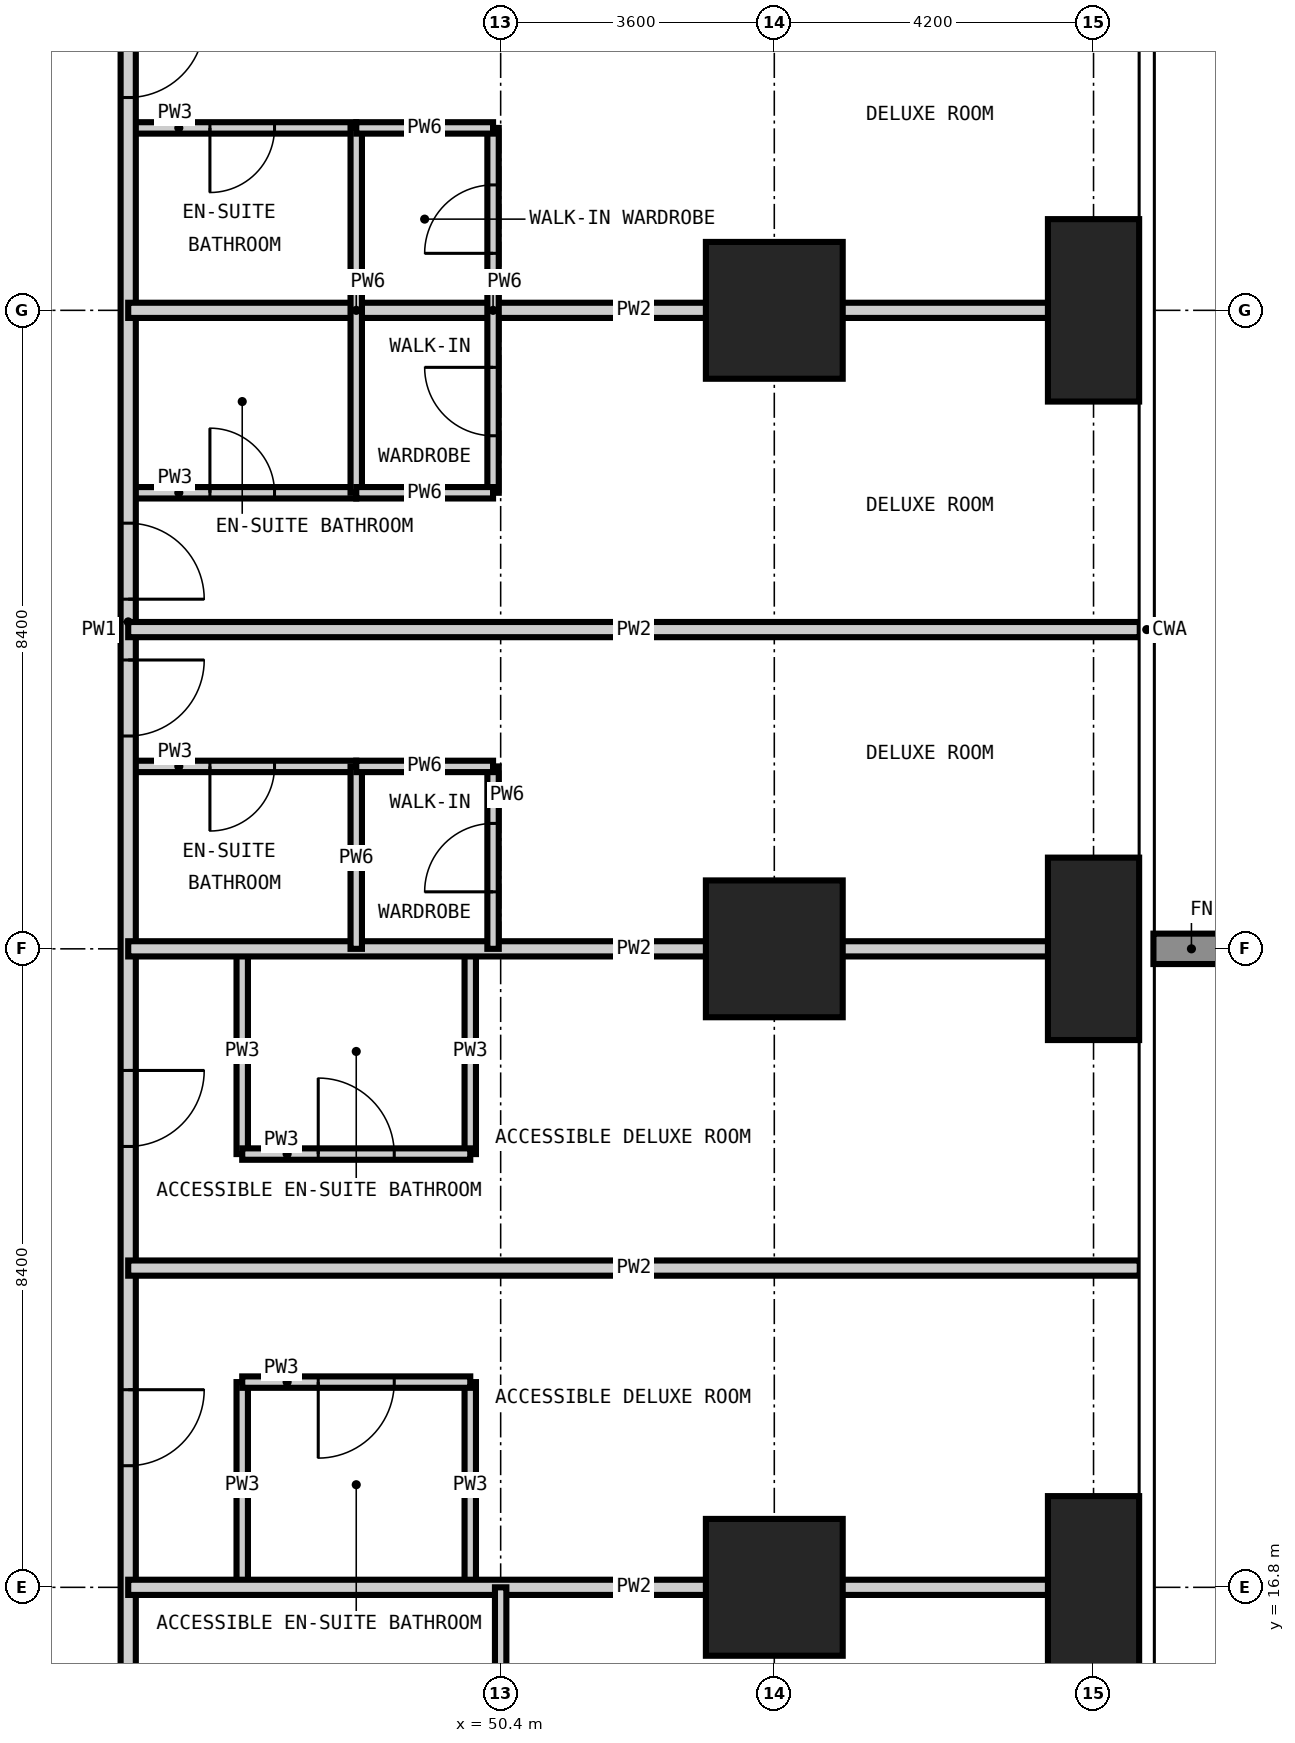
"""IFC4 building model, lengths in metres.
Left out: names, types, materials, properties, quantities, classifications, styles, units other than length and angle.
Written with IfcOpenShell. Run it as: python <this file> out.ifc"""

import sys

from ifc_helpers import new_model, si_unit, direction, frame, frame_2d, origin, origin_2d, place, context, subcontext, project, spatial, rectangle, extrude, element, fill, save


model = new_model("IFC4")
c1 = context("Model", 3, precision=1e-05, world=origin(), true_north=direction((0.0, 1.0)))
c2 = subcontext(c1, "Body", "Model", "MODEL_VIEW")
j1 = project(units=[si_unit("LENGTHUNIT", "METRE"), si_unit("PLANEANGLEUNIT", "RADIAN")], contexts=[c1])
p1 = place(None, origin())
s1 = spatial("IfcSite", under=j1, at=p1, CompositionType="ELEMENT")
p2 = place(p1, origin())
s2 = spatial("IfcBuilding", under=s1, at=p2, CompositionType="ELEMENT")
p3 = place(p2, frame((0.0, 0.0, 30.6)))
s3 = spatial("IfcBuildingStorey", under=s2, at=p3, CompositionType="ELEMENT", Elevation=30.6)
for number, where, z_axis, x_axis in (
    (1, (54.0, 16.8, -0.35), (0.0, 0.0, 1.0), (1.0, 0.0, 0.0)),
    (2, (54.0, 25.2, -0.35), (0.0, 0.0, 1.0), (1.0, 0.0, 0.0)),
    (3, (54.0, 33.6, -0.35), (0.0, 0.0, 1.0), (1.0, 0.0, 0.0)),
):
    element("IfcColumn", number, at=place(p3, frame(where, z_axis=z_axis, x_axis=x_axis)), inside=s3, PredefinedType="COLUMN", context=c2, shape_type="SweptSolid", body=[
        extrude(rectangle(XDim=1.8, YDim=1.8, at=origin_2d()), origin(), (0.0, 0.0, 1.0), 3.6),
    ])
for number, where, z_axis, x_axis in (
    (4, (58.2, 16.8, -0.35), (0.0, 0.0, 1.0), (1.0, 0.0, 0.0)),
    (5, (58.2, 25.2, -0.35), (0.0, 0.0, 1.0), (1.0, 0.0, 0.0)),
    (6, (58.2, 33.6, -0.35), (0.0, 0.0, 1.0), (1.0, 0.0, 0.0)),
):
    element("IfcColumn", number, at=place(p3, frame(where, z_axis=z_axis, x_axis=x_axis)), inside=s3, PredefinedType="COLUMN", context=c2, shape_type="SweptSolid", body=[
        extrude(rectangle(XDim=1.2, YDim=2.4, at=origin_2d()), origin(), (0.0, 0.0, 1.0), 3.6),
    ])
for number, where, z_axis, x_axis in (
    (7, (47.0, 16.8, 0.0), (0.0, 0.0, 1.0), (0.0, 1.0, 0.0)),
    (8, (47.0, 22.5, 0.0), (0.0, 0.0, 1.0), (0.0, 1.0, 0.0)),
    (9, (50.0, 16.8, 0.0), (0.0, 0.0, 1.0), (0.0, 1.0, 0.0)),
    (10, (50.0, 22.5, 0.0), (0.0, 0.0, 1.0), (0.0, 1.0, 0.0)),
):
    element("IfcWall", number, at=place(p3, frame(where, z_axis=z_axis, x_axis=x_axis)), inside=s3, PredefinedType="PARTITIONING", context=c2, shape_type="SweptSolid", body=[
        extrude(rectangle(XDim=2.7, YDim=0.15, at=frame_2d((1.35, 0.0))), origin(), (0.0, 0.0, 1.0), 3.25),
    ])
p4 = place(p3, frame((47.0, 19.5, 0.0), z_axis=(0.0, 0.0, 1.0), x_axis=(1.0, 0.0, 0.0)))
e11 = element("IfcWall", 11, at=p4, inside=s3, PredefinedType="PARTITIONING", context=c2, shape_type="SweptSolid", body=[
    extrude(rectangle(XDim=3.0, YDim=0.15, at=frame_2d((1.5, 0.0))), origin(), (0.0, 0.0, 1.0), 3.25),
])
p5 = place(p4, frame((1.0, 0.0, 0.0)))
e12 = element("IfcOpeningElement", 12, at=p5, cuts=e11, PredefinedType="OPENING", context=c2, shape_type="SweptSolid", body=[
    extrude(rectangle(XDim=1.0, YDim=2.1, at=frame_2d((0.5, 1.05))), frame((0.0, 0.085, 0.0), z_axis=(0.0, -1.0, 0.0), x_axis=(1.0, 0.0, 0.0)), (0.0, 0.0, 1.0), 0.17),
])
p6 = place(p3, frame((47.0, 22.5, 0.0), z_axis=(0.0, 0.0, 1.0), x_axis=(1.0, 0.0, 0.0)))
e13 = element("IfcWall", 13, at=p6, inside=s3, PredefinedType="PARTITIONING", context=c2, shape_type="SweptSolid", body=[
    extrude(rectangle(XDim=3.0, YDim=0.15, at=frame_2d((1.5, 0.0))), origin(), (0.0, 0.0, 1.0), 3.25),
])
p7 = place(p6, frame((1.0, 0.0, 0.0)))
e14 = element("IfcOpeningElement", 14, at=p7, cuts=e13, PredefinedType="OPENING", context=c2, shape_type="SweptSolid", body=[
    extrude(rectangle(XDim=1.0, YDim=2.1, at=frame_2d((0.5, 1.05))), frame((0.0, 0.085, 0.0), z_axis=(0.0, -1.0, 0.0), x_axis=(1.0, 0.0, 0.0)), (0.0, 0.0, 1.0), 0.17),
])
p8 = place(p3, frame((45.5, 27.6, 0.0), z_axis=(0.0, 0.0, 1.0), x_axis=(1.0, 0.0, 0.0)))
e15 = element("IfcWall", 15, at=p8, inside=s3, PredefinedType="PARTITIONING", context=c2, shape_type="SweptSolid", body=[
    extrude(rectangle(XDim=3.0, YDim=0.15, at=frame_2d((1.5, 0.0))), origin(), (0.0, 0.0, 1.0), 3.25),
])
p9 = place(p8, frame((1.075, 0.0, 0.0)))
e16 = element("IfcOpeningElement", 16, at=p9, cuts=e15, PredefinedType="OPENING", context=c2, shape_type="SweptSolid", body=[
    extrude(rectangle(XDim=0.85, YDim=2.1, at=frame_2d((0.425, 1.05))), frame((0.0, 0.085, 0.0), z_axis=(0.0, -1.0, 0.0), x_axis=(1.0, 0.0, 0.0)), (0.0, 0.0, 1.0), 0.17),
])
p10 = place(p3, frame((45.5, 31.2, 0.0), z_axis=(0.0, 0.0, 1.0), x_axis=(1.0, 0.0, 0.0)))
e17 = element("IfcWall", 17, at=p10, inside=s3, PredefinedType="PARTITIONING", context=c2, shape_type="SweptSolid", body=[
    extrude(rectangle(XDim=3.0, YDim=0.15, at=frame_2d((1.5, 0.0))), origin(), (0.0, 0.0, 1.0), 3.25),
])
p11 = place(p10, frame((1.075, 0.0, 0.0)))
e18 = element("IfcOpeningElement", 18, at=p11, cuts=e17, PredefinedType="OPENING", context=c2, shape_type="SweptSolid", body=[
    extrude(rectangle(XDim=0.85, YDim=2.1, at=frame_2d((0.425, 1.05))), frame((0.0, 0.085, 0.0), z_axis=(0.0, -1.0, 0.0), x_axis=(1.0, 0.0, 0.0)), (0.0, 0.0, 1.0), 0.17),
])
p12 = place(p3, frame((45.5, 36.0, 0.0), z_axis=(0.0, 0.0, 1.0), x_axis=(1.0, 0.0, 0.0)))
e19 = element("IfcWall", 19, at=p12, inside=s3, PredefinedType="PARTITIONING", context=c2, shape_type="SweptSolid", body=[
    extrude(rectangle(XDim=3.0, YDim=0.15, at=frame_2d((1.5, 0.0))), origin(), (0.0, 0.0, 1.0), 3.25),
])
p13 = place(p12, frame((1.075, 0.0, 0.0)))
e20 = element("IfcOpeningElement", 20, at=p13, cuts=e19, PredefinedType="OPENING", context=c2, shape_type="SweptSolid", body=[
    extrude(rectangle(XDim=0.85, YDim=2.1, at=frame_2d((0.425, 1.05))), frame((0.0, 0.085, 0.0), z_axis=(0.0, -1.0, 0.0), x_axis=(1.0, 0.0, 0.0)), (0.0, 0.0, 1.0), 0.17),
])
p14 = place(p3, frame((45.5, 45.8, 0.0), z_axis=(0.0, 0.0, 1.0), x_axis=(0.0, -1.0, 0.0)))
e21 = element("IfcWall", 21, at=p14, inside=s3, PredefinedType="PARTITIONING", context=c2, shape_type="SweptSolid", body=[
    extrude(rectangle(XDim=32.2, YDim=0.2, at=frame_2d((16.1, 0.0))), origin(), (0.0, 0.0, 1.0), 3.25),
])
p15 = place(p14, frame((26.4, 0.0, 0.0)))
e22 = element("IfcOpeningElement", 22, at=p15, cuts=e21, PredefinedType="OPENING", context=c2, shape_type="SweptSolid", body=[
    extrude(rectangle(XDim=1.0, YDim=2.2, at=frame_2d((0.5, 1.1))), frame((0.0, 0.11, 0.0), z_axis=(0.0, -1.0, 0.0), x_axis=(1.0, 0.0, 0.0)), (0.0, 0.0, 1.0), 0.22),
])
p16 = place(p14, frame((22.2, 0.0, 0.0)))
e23 = element("IfcOpeningElement", 23, at=p16, cuts=e21, PredefinedType="OPENING", context=c2, shape_type="SweptSolid", body=[
    extrude(rectangle(XDim=1.0, YDim=2.2, at=frame_2d((0.5, 1.1))), frame((0.0, 0.11, 0.0), z_axis=(0.0, -1.0, 0.0), x_axis=(1.0, 0.0, 0.0)), (0.0, 0.0, 1.0), 0.22),
])
p17 = place(p14, frame((16.8, 0.0, 0.0)))
e24 = element("IfcOpeningElement", 24, at=p17, cuts=e21, PredefinedType="OPENING", context=c2, shape_type="SweptSolid", body=[
    extrude(rectangle(XDim=1.0, YDim=2.2, at=frame_2d((0.5, 1.1))), frame((0.0, 0.11, 0.0), z_axis=(0.0, -1.0, 0.0), x_axis=(1.0, 0.0, 0.0)), (0.0, 0.0, 1.0), 0.22),
])
p18 = place(p14, frame((15.0, 0.0, 0.0)))
e25 = element("IfcOpeningElement", 25, at=p18, cuts=e21, PredefinedType="OPENING", context=c2, shape_type="SweptSolid", body=[
    extrude(rectangle(XDim=1.0, YDim=2.2, at=frame_2d((0.5, 1.1))), frame((0.0, 0.11, 0.0), z_axis=(0.0, -1.0, 0.0), x_axis=(1.0, 0.0, 0.0)), (0.0, 0.0, 1.0), 0.22),
])
p19 = place(p14, frame((8.4, 0.0, 0.0)))
e26 = element("IfcOpeningElement", 26, at=p19, cuts=e21, PredefinedType="OPENING", context=c2, shape_type="SweptSolid", body=[
    extrude(rectangle(XDim=1.0, YDim=2.2, at=frame_2d((0.5, 1.1))), frame((0.0, 0.11, 0.0), z_axis=(0.0, -1.0, 0.0), x_axis=(1.0, 0.0, 0.0)), (0.0, 0.0, 1.0), 0.22),
])
p20 = place(p14, frame((6.6, 0.0, 0.0)))
e27 = element("IfcOpeningElement", 27, at=p20, cuts=e21, PredefinedType="OPENING", context=c2, shape_type="SweptSolid", body=[
    extrude(rectangle(XDim=1.0, YDim=2.2, at=frame_2d((0.5, 1.1))), frame((0.0, 0.11, 0.0), z_axis=(0.0, -1.0, 0.0), x_axis=(1.0, 0.0, 0.0)), (0.0, 0.0, 1.0), 0.22),
])
p21 = place(p14, frame((30.1, 0.0, 0.0)))
e28 = element("IfcOpeningElement", 28, at=p21, cuts=e21, PredefinedType="OPENING", context=c2, shape_type="SweptSolid", body=[
    extrude(rectangle(XDim=1.0, YDim=2.2, at=frame_2d((0.5, 1.1))), frame((0.0, 0.11, 0.0), z_axis=(0.0, -1.0, 0.0), x_axis=(1.0, 0.0, 0.0)), (0.0, 0.0, 1.0), 0.22),
])
p22 = place(p14, frame((1.4, 0.0, 0.0)))
e29 = element("IfcOpeningElement", 29, at=p22, cuts=e21, PredefinedType="OPENING", context=c2, shape_type="SweptSolid", body=[
    extrude(rectangle(XDim=1.0, YDim=2.2, at=frame_2d((0.5, 1.1))), frame((0.0, 0.11, 0.0), z_axis=(0.0, -1.0, 0.0), x_axis=(1.0, 0.0, 0.0)), (0.0, 0.0, 1.0), 0.22),
])
for number, where, z_axis, x_axis in (
    (30, (45.5, 16.8, 0.0), (0.0, 0.0, 1.0), (1.0, 0.0, 0.0)),
    (31, (45.5, 21.0, 0.0), (0.0, 0.0, 1.0), (1.0, 0.0, 0.0)),
    (32, (45.5, 25.2, 0.0), (0.0, 0.0, 1.0), (1.0, 0.0, 0.0)),
    (33, (45.5, 29.4, 0.0), (0.0, 0.0, 1.0), (1.0, 0.0, 0.0)),
    (34, (45.5, 33.6, 0.0), (0.0, 0.0, 1.0), (1.0, 0.0, 0.0)),
):
    element("IfcWall", number, at=place(p3, frame(where, z_axis=z_axis, x_axis=x_axis)), inside=s3, PredefinedType="PARTITIONING", context=c2, shape_type="SweptSolid", body=[
        extrude(rectangle(XDim=13.308, YDim=0.2, at=frame_2d((6.654, 0.0))), origin(), (0.0, 0.0, 1.0), 3.25),
    ])
p23 = place(p3, frame((48.5, 25.2, 0.0), z_axis=(0.0, 0.0, 1.0), x_axis=(0.0, 1.0, 0.0)))
e35 = element("IfcWall", 35, at=p23, inside=s3, PredefinedType="PARTITIONING", context=c2, shape_type="SweptSolid", body=[
    extrude(rectangle(XDim=2.4, YDim=0.15, at=frame_2d((1.2, 0.0))), origin(), (0.0, 0.0, 1.0), 3.25),
])
p24 = place(p3, frame((48.5, 31.2, 0.0), z_axis=(0.0, 0.0, 1.0), x_axis=(0.0, 1.0, 0.0)))
e36 = element("IfcWall", 36, at=p24, inside=s3, PredefinedType="PARTITIONING", context=c2, shape_type="SweptSolid", body=[
    extrude(rectangle(XDim=4.8, YDim=0.15, at=frame_2d((2.4, 0.0))), origin(), (0.0, 0.0, 1.0), 3.25),
])
p25 = place(p3, frame((50.3, 25.2, 0.0), z_axis=(0.0, 0.0, 1.0), x_axis=(0.0, 1.0, 0.0)))
e37 = element("IfcWall", 37, at=p25, inside=s3, PredefinedType="PARTITIONING", context=c2, shape_type="SweptSolid", body=[
    extrude(rectangle(XDim=2.4, YDim=0.15, at=frame_2d((1.2, 0.0))), origin(), (0.0, 0.0, 1.0), 3.25),
])
p26 = place(p25, frame((0.75, 0.0, 0.0)))
e38 = element("IfcOpeningElement", 38, at=p26, cuts=e37, PredefinedType="OPENING", context=c2, shape_type="SweptSolid", body=[
    extrude(rectangle(XDim=0.9, YDim=2.1, at=frame_2d((0.45, 1.05))), frame((0.0, 0.085, 0.0), z_axis=(0.0, -1.0, 0.0), x_axis=(1.0, 0.0, 0.0)), (0.0, 0.0, 1.0), 0.17),
])
p27 = place(p3, frame((50.3, 31.2, 0.0), z_axis=(0.0, 0.0, 1.0), x_axis=(0.0, 1.0, 0.0)))
e39 = element("IfcWall", 39, at=p27, inside=s3, PredefinedType="PARTITIONING", context=c2, shape_type="SweptSolid", body=[
    extrude(rectangle(XDim=4.8, YDim=0.15, at=frame_2d((2.4, 0.0))), origin(), (0.0, 0.0, 1.0), 3.25),
])
p28 = place(p27, frame((0.75, 0.0, 0.0)))
e40 = element("IfcOpeningElement", 40, at=p28, cuts=e39, PredefinedType="OPENING", context=c2, shape_type="SweptSolid", body=[
    extrude(rectangle(XDim=0.9, YDim=2.1, at=frame_2d((0.45, 1.05))), frame((0.0, 0.085, 0.0), z_axis=(0.0, -1.0, 0.0), x_axis=(1.0, 0.0, 0.0)), (0.0, 0.0, 1.0), 0.17),
])
p29 = place(p27, frame((3.15, 0.0, 0.0)))
e41 = element("IfcOpeningElement", 41, at=p29, cuts=e39, PredefinedType="OPENING", context=c2, shape_type="SweptSolid", body=[
    extrude(rectangle(XDim=0.9, YDim=2.1, at=frame_2d((0.45, 1.05))), frame((0.0, 0.085, 0.0), z_axis=(0.0, -1.0, 0.0), x_axis=(1.0, 0.0, 0.0)), (0.0, 0.0, 1.0), 0.17),
])
p30 = place(p3, frame((50.4, -0.008, 0.0), z_axis=(0.0, 0.0, 1.0), x_axis=(0.0, 1.0, 0.0)))
e42 = element("IfcWall", 42, at=p30, inside=s3, PredefinedType="PARTITIONING", context=c2, shape_type="SweptSolid", body=[
    extrude(rectangle(XDim=16.808, YDim=0.15, at=frame_2d((8.404, 0.0))), origin(), (0.0, 0.0, 1.0), 3.25),
])
p31 = place(p30, frame((1.958, 0.0, 0.0)))
e43 = element("IfcOpeningElement", 43, at=p31, cuts=e42, PredefinedType="OPENING", context=c2, shape_type="SweptSolid", body=[
    extrude(rectangle(XDim=0.9, YDim=2.1, at=frame_2d((0.45, 1.05))), frame((0.0, 0.085, 0.0), z_axis=(0.0, -1.0, 0.0), x_axis=(1.0, 0.0, 0.0)), (0.0, 0.0, 1.0), 0.17),
])
p32 = place(p30, frame((12.158, 0.0, 0.0)))
e44 = element("IfcOpeningElement", 44, at=p32, cuts=e42, PredefinedType="OPENING", context=c2, shape_type="SweptSolid", body=[
    extrude(rectangle(XDim=0.9, YDim=2.1, at=frame_2d((0.45, 1.05))), frame((0.0, 0.085, 0.0), z_axis=(0.0, -1.0, 0.0), x_axis=(1.0, 0.0, 0.0)), (0.0, 0.0, 1.0), 0.17),
])
for number, where, z_axis, x_axis in (
    (45, (48.5, 27.6, 0.0), (0.0, 0.0, 1.0), (1.0, 0.0, 0.0)),
    (46, (48.5, 31.2, 0.0), (0.0, 0.0, 1.0), (1.0, 0.0, 0.0)),
    (47, (48.5, 36.0, 0.0), (0.0, 0.0, 1.0), (1.0, 0.0, 0.0)),
):
    element("IfcWall", number, at=place(p3, frame(where, z_axis=z_axis, x_axis=x_axis)), inside=s3, PredefinedType="PARTITIONING", context=c2, shape_type="SweptSolid", body=[
        extrude(rectangle(XDim=1.8, YDim=0.15, at=frame_2d((0.9, 0.0))), origin(), (0.0, 0.0, 1.0), 3.25),
    ])
p33 = place(p15, origin())
e48 = element("IfcDoor", 48, at=p33, inside=s3, OperationType="SINGLE_SWING_LEFT", PredefinedType="DOOR", context=c2, shape_type="SweptSolid", body=[
    extrude(rectangle(XDim=1.0, YDim=2.2, at=frame_2d((0.5, 1.1))), frame((0.0, 0.025, 0.0), z_axis=(0.0, -1.0, 0.0), x_axis=(1.0, 0.0, 0.0)), (0.0, 0.0, 1.0), 0.05),
])
fill(e22, e48)
p34 = place(p5, frame((1.0, 0.0, 0.0), z_axis=(0.0, 0.0, 1.0), x_axis=(-1.0, 0.0, 0.0)))
e49 = element("IfcDoor", 49, at=p34, inside=s3, OperationType="SINGLE_SWING_RIGHT", PredefinedType="DOOR", context=c2, shape_type="SweptSolid", body=[
    extrude(rectangle(XDim=1.0, YDim=2.1, at=frame_2d((0.5, 1.05))), frame((0.0, 0.025, 0.0), z_axis=(0.0, -1.0, 0.0), x_axis=(1.0, 0.0, 0.0)), (0.0, 0.0, 1.0), 0.05),
])
fill(e12, e49)
p35 = place(p16, origin())
e50 = element("IfcDoor", 50, at=p35, inside=s3, OperationType="SINGLE_SWING_LEFT", PredefinedType="DOOR", context=c2, shape_type="SweptSolid", body=[
    extrude(rectangle(XDim=1.0, YDim=2.2, at=frame_2d((0.5, 1.1))), frame((0.0, 0.025, 0.0), z_axis=(0.0, -1.0, 0.0), x_axis=(1.0, 0.0, 0.0)), (0.0, 0.0, 1.0), 0.05),
])
fill(e23, e50)
p36 = place(p7, origin())
e51 = element("IfcDoor", 51, at=p36, inside=s3, OperationType="SINGLE_SWING_LEFT", PredefinedType="DOOR", context=c2, shape_type="SweptSolid", body=[
    extrude(rectangle(XDim=1.0, YDim=2.1, at=frame_2d((0.5, 1.05))), frame((0.0, 0.025, 0.0), z_axis=(0.0, -1.0, 0.0), x_axis=(1.0, 0.0, 0.0)), (0.0, 0.0, 1.0), 0.05),
])
fill(e14, e51)
p37 = place(p17, origin())
e52 = element("IfcDoor", 52, at=p37, inside=s3, OperationType="SINGLE_SWING_LEFT", PredefinedType="DOOR", context=c2, shape_type="SweptSolid", body=[
    extrude(rectangle(XDim=1.0, YDim=2.2, at=frame_2d((0.5, 1.1))), frame((0.0, 0.025, 0.0), z_axis=(0.0, -1.0, 0.0), x_axis=(1.0, 0.0, 0.0)), (0.0, 0.0, 1.0), 0.05),
])
fill(e24, e52)
p38 = place(p9, frame((0.85, 0.0, 0.0), z_axis=(0.0, 0.0, 1.0), x_axis=(-1.0, 0.0, 0.0)))
e53 = element("IfcDoor", 53, at=p38, inside=s3, OperationType="SINGLE_SWING_RIGHT", PredefinedType="DOOR", context=c2, shape_type="SweptSolid", body=[
    extrude(rectangle(XDim=0.85, YDim=2.1, at=frame_2d((0.425, 1.05))), frame((0.0, 0.025, 0.0), z_axis=(0.0, -1.0, 0.0), x_axis=(1.0, 0.0, 0.0)), (0.0, 0.0, 1.0), 0.05),
])
fill(e16, e53)
p39 = place(p26, origin())
e54 = element("IfcDoor", 54, at=p39, inside=s3, OperationType="SINGLE_SWING_LEFT", PredefinedType="DOOR", context=c2, shape_type="SweptSolid", body=[
    extrude(rectangle(XDim=0.9, YDim=2.1, at=frame_2d((0.45, 1.05))), frame((0.0, 0.025, 0.0), z_axis=(0.0, -1.0, 0.0), x_axis=(1.0, 0.0, 0.0)), (0.0, 0.0, 1.0), 0.05),
])
fill(e38, e54)
p40 = place(p18, origin())
e55 = element("IfcDoor", 55, at=p40, inside=s3, OperationType="SINGLE_SWING_RIGHT", PredefinedType="DOOR", context=c2, shape_type="SweptSolid", body=[
    extrude(rectangle(XDim=1.0, YDim=2.2, at=frame_2d((0.5, 1.1))), frame((0.0, 0.025, 0.0), z_axis=(0.0, -1.0, 0.0), x_axis=(1.0, 0.0, 0.0)), (0.0, 0.0, 1.0), 0.05),
])
fill(e25, e55)
p41 = place(p11, origin())
e56 = element("IfcDoor", 56, at=p41, inside=s3, OperationType="SINGLE_SWING_LEFT", PredefinedType="DOOR", context=c2, shape_type="SweptSolid", body=[
    extrude(rectangle(XDim=0.85, YDim=2.1, at=frame_2d((0.425, 1.05))), frame((0.0, 0.025, 0.0), z_axis=(0.0, -1.0, 0.0), x_axis=(1.0, 0.0, 0.0)), (0.0, 0.0, 1.0), 0.05),
])
fill(e18, e56)
p42 = place(p28, origin())
e57 = element("IfcDoor", 57, at=p42, inside=s3, OperationType="SINGLE_SWING_RIGHT", PredefinedType="DOOR", context=c2, shape_type="SweptSolid", body=[
    extrude(rectangle(XDim=0.9, YDim=2.1, at=frame_2d((0.45, 1.05))), frame((0.0, 0.025, 0.0), z_axis=(0.0, -1.0, 0.0), x_axis=(1.0, 0.0, 0.0)), (0.0, 0.0, 1.0), 0.05),
])
fill(e40, e57)
p43 = place(p19, origin())
e58 = element("IfcDoor", 58, at=p43, inside=s3, OperationType="SINGLE_SWING_LEFT", PredefinedType="DOOR", context=c2, shape_type="SweptSolid", body=[
    extrude(rectangle(XDim=1.0, YDim=2.2, at=frame_2d((0.5, 1.1))), frame((0.0, 0.025, 0.0), z_axis=(0.0, -1.0, 0.0), x_axis=(1.0, 0.0, 0.0)), (0.0, 0.0, 1.0), 0.05),
])
fill(e26, e58)
p44 = place(p13, frame((0.85, 0.0, 0.0), z_axis=(0.0, 0.0, 1.0), x_axis=(-1.0, 0.0, 0.0)))
e59 = element("IfcDoor", 59, at=p44, inside=s3, OperationType="SINGLE_SWING_RIGHT", PredefinedType="DOOR", context=c2, shape_type="SweptSolid", body=[
    extrude(rectangle(XDim=0.85, YDim=2.1, at=frame_2d((0.425, 1.05))), frame((0.0, 0.025, 0.0), z_axis=(0.0, -1.0, 0.0), x_axis=(1.0, 0.0, 0.0)), (0.0, 0.0, 1.0), 0.05),
])
fill(e20, e59)
p45 = place(p29, origin())
e60 = element("IfcDoor", 60, at=p45, inside=s3, OperationType="SINGLE_SWING_LEFT", PredefinedType="DOOR", context=c2, shape_type="SweptSolid", body=[
    extrude(rectangle(XDim=0.9, YDim=2.1, at=frame_2d((0.45, 1.05))), frame((0.0, 0.025, 0.0), z_axis=(0.0, -1.0, 0.0), x_axis=(1.0, 0.0, 0.0)), (0.0, 0.0, 1.0), 0.05),
])
fill(e41, e60)
save(model, sys.argv[1])
